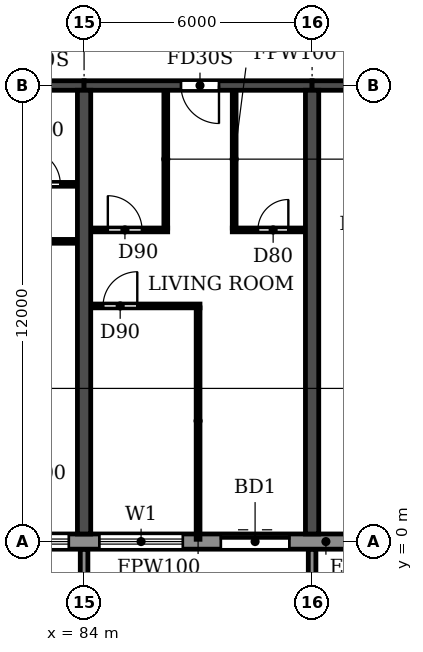
"""IFC4 building model, lengths in metres.
Left out: names, types, materials, properties, quantities, classifications, styles, units other than length and angle.
Written with IfcOpenShell. Run it as: python <this file> out.ifc"""

import sys

from ifc_helpers import new_model, si_unit, direction, frame, frame_2d, origin, place, context, subcontext, project, spatial, polyline, rectangle, outline, extrude, source, transform, mapped, element, fill, save


model = new_model("IFC4")
c1 = context("Model", 3, precision=1e-05, world=origin(), true_north=direction((0.0, 1.0)))
c2 = subcontext(c1, "Body", "Model", "MODEL_VIEW")
j1 = project(units=[si_unit("LENGTHUNIT", "METRE"), si_unit("PLANEANGLEUNIT", "RADIAN")], contexts=[c1])
p1 = place(None, origin())
s1 = spatial("IfcSite", under=j1, at=p1, CompositionType="ELEMENT")
p2 = place(p1, origin())
s2 = spatial("IfcBuilding", under=s1, at=p2, CompositionType="ELEMENT")
p3 = place(p2, frame((0.0, 0.0, 102.6)))
s3 = spatial("IfcBuildingStorey", under=s2, at=p3, CompositionType="ELEMENT", Elevation=102.6)
for number, where, z_axis, x_axis in (
    (1, (84.0, 0.2, 0.0), (0.0, 0.0, 1.0), (0.0, 1.0, 0.0)),
    (2, (90.0, 0.2, 0.0), (0.0, 0.0, 1.0), (0.0, 1.0, 0.0)),
):
    element("IfcWall", number, at=place(p3, frame(where, z_axis=z_axis, x_axis=x_axis)), inside=s3, PredefinedType="SHEAR", context=c2, shape_type="SweptSolid", body=[
        extrude(rectangle(XDim=11.675, YDim=0.35, at=frame_2d((5.837, 0.0))), origin(), (0.0, 0.0, 1.0), 3.0),
    ])
p4 = place(p3, frame((78.0, 12.0, 0.0), z_axis=(0.0, 0.0, 1.0), x_axis=(1.0, 0.0, 0.0)))
e3 = element("IfcWall", 3, at=p4, inside=s3, PredefinedType="SHEAR", context=c2, shape_type="SweptSolid", body=[
    extrude(rectangle(XDim=6.0, YDim=0.25, at=frame_2d((3.0, 0.0))), origin(), (0.0, 0.0, 1.0), 2.4),
])
p5 = place(p4, frame((2.45, 0.0, 0.0)))
e4 = element("IfcOpeningElement", 4, at=p5, cuts=e3, PredefinedType="OPENING", context=c2, shape_type="SweptSolid", body=[
    extrude(rectangle(XDim=1.0, YDim=2.1, at=frame_2d((0.5, 1.05))), frame((0.0, 0.135, 0.0), z_axis=(0.0, -1.0, 0.0), x_axis=(1.0, 0.0, 0.0)), (0.0, 0.0, 1.0), 0.27),
])
p6 = place(p3, frame((84.0, 12.0, 0.0), z_axis=(0.0, 0.0, 1.0), x_axis=(1.0, 0.0, 0.0)))
e5 = element("IfcWall", 5, at=p6, inside=s3, PredefinedType="SHEAR", context=c2, shape_type="SweptSolid", body=[
    extrude(rectangle(XDim=6.0, YDim=0.25, at=frame_2d((3.0, 0.0))), origin(), (0.0, 0.0, 1.0), 2.4),
])
p7 = place(p6, frame((2.55, 0.0, 0.0)))
e6 = element("IfcOpeningElement", 6, at=p7, cuts=e5, PredefinedType="OPENING", context=c2, shape_type="SweptSolid", body=[
    extrude(rectangle(XDim=1.0, YDim=2.1, at=frame_2d((0.5, 1.05))), frame((0.0, 0.135, 0.0), z_axis=(0.0, -1.0, 0.0), x_axis=(1.0, 0.0, 0.0)), (0.0, 0.0, 1.0), 0.27),
])
p8 = place(p3, frame((90.0, 12.0, 0.0), z_axis=(0.0, 0.0, 1.0), x_axis=(1.0, 0.0, 0.0)))
e7 = element("IfcWall", 7, at=p8, inside=s3, PredefinedType="SHEAR", context=c2, shape_type="SweptSolid", body=[
    extrude(rectangle(XDim=5.8, YDim=0.25, at=frame_2d((2.9, 0.0))), origin(), (0.0, 0.0, 1.0), 2.4),
])
p9 = place(p8, frame((2.5, 0.0, 0.0)))
e8 = element("IfcOpeningElement", 8, at=p9, cuts=e7, PredefinedType="OPENING", context=c2, shape_type="SweptSolid", body=[
    extrude(rectangle(XDim=1.0, YDim=2.1, at=frame_2d((0.5, 1.05))), frame((0.0, 0.135, 0.0), z_axis=(0.0, -1.0, 0.0), x_axis=(1.0, 0.0, 0.0)), (0.0, 0.0, 1.0), 0.27),
])
p10 = place(p3, frame((10.683, 0.0, 0.0), z_axis=(0.0, 0.0, 1.0), x_axis=(1.0, 0.0, 0.0)))
e9 = element("IfcWall", 9, at=p10, inside=s3, PredefinedType="STANDARD", context=c2, shape_type="SweptSolid", body=[
    extrude(rectangle(XDim=80.634, YDim=0.4, at=frame_2d((40.317, 0.0))), origin(), (0.0, 0.0, 1.0), 3.0),
])
p11 = place(p10, frame((1.717, 0.0, 0.9)))
e10 = element("IfcOpeningElement", 10, at=p11, cuts=e9, PredefinedType="OPENING", context=c2, shape_type="SweptSolid", body=[
    extrude(rectangle(XDim=2.2, YDim=1.5, at=frame_2d((1.1, 0.75))), frame((0.0, 0.21, 0.0), z_axis=(0.0, -1.0, 0.0), x_axis=(1.0, 0.0, 0.0)), (0.0, 0.0, 1.0), 0.42),
])
p12 = place(p10, frame((4.917, 0.0, 0.0)))
e11 = element("IfcOpeningElement", 11, at=p12, cuts=e9, PredefinedType="OPENING", context=c2, shape_type="SweptSolid", body=[
    extrude(rectangle(XDim=1.8, YDim=2.4, at=frame_2d((0.9, 1.2))), frame((0.0, 0.21, 0.0), z_axis=(0.0, -1.0, 0.0), x_axis=(1.0, 0.0, 0.0)), (0.0, 0.0, 1.0), 0.42),
])
p13 = place(p10, frame((7.717, 0.0, 0.9)))
e12 = element("IfcOpeningElement", 12, at=p13, cuts=e9, PredefinedType="OPENING", context=c2, shape_type="SweptSolid", body=[
    extrude(rectangle(XDim=2.2, YDim=1.5, at=frame_2d((1.1, 0.75))), frame((0.0, 0.21, 0.0), z_axis=(0.0, -1.0, 0.0), x_axis=(1.0, 0.0, 0.0)), (0.0, 0.0, 1.0), 0.42),
])
p14 = place(p10, frame((10.717, 0.0, 0.9)))
e13 = element("IfcOpeningElement", 13, at=p14, cuts=e9, PredefinedType="OPENING", context=c2, shape_type="SweptSolid", body=[
    extrude(rectangle(XDim=2.2, YDim=1.5, at=frame_2d((1.1, 0.75))), frame((0.0, 0.21, 0.0), z_axis=(0.0, -1.0, 0.0), x_axis=(1.0, 0.0, 0.0)), (0.0, 0.0, 1.0), 0.42),
])
p15 = place(p10, frame((13.717, 0.0, 0.9)))
e14 = element("IfcOpeningElement", 14, at=p15, cuts=e9, PredefinedType="OPENING", context=c2, shape_type="SweptSolid", body=[
    extrude(rectangle(XDim=2.2, YDim=1.5, at=frame_2d((1.1, 0.75))), frame((0.0, 0.21, 0.0), z_axis=(0.0, -1.0, 0.0), x_axis=(1.0, 0.0, 0.0)), (0.0, 0.0, 1.0), 0.42),
])
p16 = place(p10, frame((16.717, 0.0, 0.9)))
e15 = element("IfcOpeningElement", 15, at=p16, cuts=e9, PredefinedType="OPENING", context=c2, shape_type="SweptSolid", body=[
    extrude(rectangle(XDim=2.2, YDim=1.5, at=frame_2d((1.1, 0.75))), frame((0.0, 0.21, 0.0), z_axis=(0.0, -1.0, 0.0), x_axis=(1.0, 0.0, 0.0)), (0.0, 0.0, 1.0), 0.42),
])
p17 = place(p10, frame((19.717, 0.0, 0.9)))
e16 = element("IfcOpeningElement", 16, at=p17, cuts=e9, PredefinedType="OPENING", context=c2, shape_type="SweptSolid", body=[
    extrude(rectangle(XDim=2.2, YDim=1.5, at=frame_2d((1.1, 0.75))), frame((0.0, 0.21, 0.0), z_axis=(0.0, -1.0, 0.0), x_axis=(1.0, 0.0, 0.0)), (0.0, 0.0, 1.0), 0.42),
])
p18 = place(p10, frame((22.717, 0.0, 0.9)))
e17 = element("IfcOpeningElement", 17, at=p18, cuts=e9, PredefinedType="OPENING", context=c2, shape_type="SweptSolid", body=[
    extrude(rectangle(XDim=2.2, YDim=1.5, at=frame_2d((1.1, 0.75))), frame((0.0, 0.21, 0.0), z_axis=(0.0, -1.0, 0.0), x_axis=(1.0, 0.0, 0.0)), (0.0, 0.0, 1.0), 0.42),
])
p19 = place(p10, frame((25.717, 0.0, 0.9)))
e18 = element("IfcOpeningElement", 18, at=p19, cuts=e9, PredefinedType="OPENING", context=c2, shape_type="SweptSolid", body=[
    extrude(rectangle(XDim=2.2, YDim=1.5, at=frame_2d((1.1, 0.75))), frame((0.0, 0.21, 0.0), z_axis=(0.0, -1.0, 0.0), x_axis=(1.0, 0.0, 0.0)), (0.0, 0.0, 1.0), 0.42),
])
p20 = place(p10, frame((28.917, 0.0, 0.0)))
e19 = element("IfcOpeningElement", 19, at=p20, cuts=e9, PredefinedType="OPENING", context=c2, shape_type="SweptSolid", body=[
    extrude(rectangle(XDim=1.8, YDim=2.4, at=frame_2d((0.9, 1.2))), frame((0.0, 0.21, 0.0), z_axis=(0.0, -1.0, 0.0), x_axis=(1.0, 0.0, 0.0)), (0.0, 0.0, 1.0), 0.42),
])
p21 = place(p10, frame((31.717, 0.0, 0.9)))
e20 = element("IfcOpeningElement", 20, at=p21, cuts=e9, PredefinedType="OPENING", context=c2, shape_type="SweptSolid", body=[
    extrude(rectangle(XDim=2.2, YDim=1.5, at=frame_2d((1.1, 0.75))), frame((0.0, 0.21, 0.0), z_axis=(0.0, -1.0, 0.0), x_axis=(1.0, 0.0, 0.0)), (0.0, 0.0, 1.0), 0.42),
])
p22 = place(p10, frame((34.717, 0.0, 0.9)))
e21 = element("IfcOpeningElement", 21, at=p22, cuts=e9, PredefinedType="OPENING", context=c2, shape_type="SweptSolid", body=[
    extrude(rectangle(XDim=2.2, YDim=1.5, at=frame_2d((1.1, 0.75))), frame((0.0, 0.21, 0.0), z_axis=(0.0, -1.0, 0.0), x_axis=(1.0, 0.0, 0.0)), (0.0, 0.0, 1.0), 0.42),
])
p23 = place(p10, frame((37.717, 0.0, 0.9)))
e22 = element("IfcOpeningElement", 22, at=p23, cuts=e9, PredefinedType="OPENING", context=c2, shape_type="SweptSolid", body=[
    extrude(rectangle(XDim=2.2, YDim=1.5, at=frame_2d((1.1, 0.75))), frame((0.0, 0.21, 0.0), z_axis=(0.0, -1.0, 0.0), x_axis=(1.0, 0.0, 0.0)), (0.0, 0.0, 1.0), 0.42),
])
p24 = place(p10, frame((40.717, 0.0, 0.9)))
e23 = element("IfcOpeningElement", 23, at=p24, cuts=e9, PredefinedType="OPENING", context=c2, shape_type="SweptSolid", body=[
    extrude(rectangle(XDim=2.2, YDim=1.5, at=frame_2d((1.1, 0.75))), frame((0.0, 0.21, 0.0), z_axis=(0.0, -1.0, 0.0), x_axis=(1.0, 0.0, 0.0)), (0.0, 0.0, 1.0), 0.42),
])
p25 = place(p10, frame((43.717, 0.0, 0.9)))
e24 = element("IfcOpeningElement", 24, at=p25, cuts=e9, PredefinedType="OPENING", context=c2, shape_type="SweptSolid", body=[
    extrude(rectangle(XDim=2.2, YDim=1.5, at=frame_2d((1.1, 0.75))), frame((0.0, 0.21, 0.0), z_axis=(0.0, -1.0, 0.0), x_axis=(1.0, 0.0, 0.0)), (0.0, 0.0, 1.0), 0.42),
])
p26 = place(p10, frame((46.717, 0.0, 0.9)))
e25 = element("IfcOpeningElement", 25, at=p26, cuts=e9, PredefinedType="OPENING", context=c2, shape_type="SweptSolid", body=[
    extrude(rectangle(XDim=2.2, YDim=1.5, at=frame_2d((1.1, 0.75))), frame((0.0, 0.21, 0.0), z_axis=(0.0, -1.0, 0.0), x_axis=(1.0, 0.0, 0.0)), (0.0, 0.0, 1.0), 0.42),
])
p27 = place(p10, frame((49.917, 0.0, 0.0)))
e26 = element("IfcOpeningElement", 26, at=p27, cuts=e9, PredefinedType="OPENING", context=c2, shape_type="SweptSolid", body=[
    extrude(rectangle(XDim=1.8, YDim=2.4, at=frame_2d((0.9, 1.2))), frame((0.0, 0.21, 0.0), z_axis=(0.0, -1.0, 0.0), x_axis=(1.0, 0.0, 0.0)), (0.0, 0.0, 1.0), 0.42),
])
p28 = place(p10, frame((52.717, 0.0, 0.9)))
e27 = element("IfcOpeningElement", 27, at=p28, cuts=e9, PredefinedType="OPENING", context=c2, shape_type="SweptSolid", body=[
    extrude(rectangle(XDim=2.2, YDim=1.5, at=frame_2d((1.1, 0.75))), frame((0.0, 0.21, 0.0), z_axis=(0.0, -1.0, 0.0), x_axis=(1.0, 0.0, 0.0)), (0.0, 0.0, 1.0), 0.42),
])
p29 = place(p10, frame((55.717, 0.0, 0.9)))
e28 = element("IfcOpeningElement", 28, at=p29, cuts=e9, PredefinedType="OPENING", context=c2, shape_type="SweptSolid", body=[
    extrude(rectangle(XDim=2.2, YDim=1.5, at=frame_2d((1.1, 0.75))), frame((0.0, 0.21, 0.0), z_axis=(0.0, -1.0, 0.0), x_axis=(1.0, 0.0, 0.0)), (0.0, 0.0, 1.0), 0.42),
])
p30 = place(p10, frame((58.717, 0.0, 0.9)))
e29 = element("IfcOpeningElement", 29, at=p30, cuts=e9, PredefinedType="OPENING", context=c2, shape_type="SweptSolid", body=[
    extrude(rectangle(XDim=2.2, YDim=1.5, at=frame_2d((1.1, 0.75))), frame((0.0, 0.21, 0.0), z_axis=(0.0, -1.0, 0.0), x_axis=(1.0, 0.0, 0.0)), (0.0, 0.0, 1.0), 0.42),
])
p31 = place(p10, frame((61.717, 0.0, 0.9)))
e30 = element("IfcOpeningElement", 30, at=p31, cuts=e9, PredefinedType="OPENING", context=c2, shape_type="SweptSolid", body=[
    extrude(rectangle(XDim=2.2, YDim=1.5, at=frame_2d((1.1, 0.75))), frame((0.0, 0.21, 0.0), z_axis=(0.0, -1.0, 0.0), x_axis=(1.0, 0.0, 0.0)), (0.0, 0.0, 1.0), 0.42),
])
p32 = place(p10, frame((64.717, 0.0, 0.9)))
e31 = element("IfcOpeningElement", 31, at=p32, cuts=e9, PredefinedType="OPENING", context=c2, shape_type="SweptSolid", body=[
    extrude(rectangle(XDim=2.2, YDim=1.5, at=frame_2d((1.1, 0.75))), frame((0.0, 0.21, 0.0), z_axis=(0.0, -1.0, 0.0), x_axis=(1.0, 0.0, 0.0)), (0.0, 0.0, 1.0), 0.42),
])
p33 = place(p10, frame((67.717, 0.0, 0.9)))
e32 = element("IfcOpeningElement", 32, at=p33, cuts=e9, PredefinedType="OPENING", context=c2, shape_type="SweptSolid", body=[
    extrude(rectangle(XDim=2.2, YDim=1.5, at=frame_2d((1.1, 0.75))), frame((0.0, 0.21, 0.0), z_axis=(0.0, -1.0, 0.0), x_axis=(1.0, 0.0, 0.0)), (0.0, 0.0, 1.0), 0.42),
])
p34 = place(p10, frame((70.717, 0.0, 0.9)))
e33 = element("IfcOpeningElement", 33, at=p34, cuts=e9, PredefinedType="OPENING", context=c2, shape_type="SweptSolid", body=[
    extrude(rectangle(XDim=2.2, YDim=1.5, at=frame_2d((1.1, 0.75))), frame((0.0, 0.21, 0.0), z_axis=(0.0, -1.0, 0.0), x_axis=(1.0, 0.0, 0.0)), (0.0, 0.0, 1.0), 0.42),
])
p35 = place(p10, frame((73.717, 0.0, 0.9)))
e34 = element("IfcOpeningElement", 34, at=p35, cuts=e9, PredefinedType="OPENING", context=c2, shape_type="SweptSolid", body=[
    extrude(rectangle(XDim=2.2, YDim=1.5, at=frame_2d((1.1, 0.75))), frame((0.0, 0.21, 0.0), z_axis=(0.0, -1.0, 0.0), x_axis=(1.0, 0.0, 0.0)), (0.0, 0.0, 1.0), 0.42),
])
p36 = place(p10, frame((76.917, 0.0, 0.0)))
e35 = element("IfcOpeningElement", 35, at=p36, cuts=e9, PredefinedType="OPENING", context=c2, shape_type="SweptSolid", body=[
    extrude(rectangle(XDim=1.8, YDim=2.4, at=frame_2d((0.9, 1.2))), frame((0.0, 0.21, 0.0), z_axis=(0.0, -1.0, 0.0), x_axis=(1.0, 0.0, 0.0)), (0.0, 0.0, 1.0), 0.42),
])
m1 = source(origin(), c2, "Body", "SweptSolid", [
    extrude(outline(polyline([(0.0, 0.0), (0.2, 0.0), (0.2, 1.65), (0.0, 1.65), (0.0, 0.0)])), origin(), (0.0, 0.0, 1.0), 3.1),
])
for number, where in (
    (36, (83.9, -1.85, 0.0)),
    (37, (89.9, -1.85, 0.0)),
):
    element("IfcWall", number, at=place(p3, frame(where)), inside=s3, PredefinedType="STANDARD", context=c2, shape_type="MappedRepresentation", body=[
        mapped(m1, transform((0.0, 0.0, 0.0))),
    ])
p37 = place(p3, frame((84.185, 6.2, 0.0), z_axis=(0.0, 0.0, 1.0), x_axis=(1.0, 0.0, 0.0)))
e38 = element("IfcWall", 38, at=p37, inside=s3, PredefinedType="PARTITIONING", context=c2, shape_type="SweptSolid", body=[
    extrude(rectangle(XDim=2.865, YDim=0.1, at=frame_2d((1.433, 0.0))), origin(), (0.0, 0.0, 1.0), 3.0),
])
p38 = place(p37, frame((0.315, 0.0, 0.0)))
e39 = element("IfcOpeningElement", 39, at=p38, cuts=e38, PredefinedType="OPENING", context=c2, shape_type="SweptSolid", body=[
    extrude(rectangle(XDim=0.9, YDim=2.1, at=frame_2d((0.45, 1.05))), frame((0.0, 0.06, 0.0), z_axis=(0.0, -1.0, 0.0), x_axis=(1.0, 0.0, 0.0)), (0.0, 0.0, 1.0), 0.12),
])
p39 = place(p3, frame((80.95, 7.9, 0.0), z_axis=(0.0, 0.0, 1.0), x_axis=(1.0, 0.0, 0.0)))
e40 = element("IfcWall", 40, at=p39, inside=s3, PredefinedType="PARTITIONING", context=c2, shape_type="SweptSolid", body=[
    extrude(rectangle(XDim=2.865, YDim=0.1, at=frame_2d((1.433, 0.0))), origin(), (0.0, 0.0, 1.0), 3.0),
])
p40 = place(p39, frame((0.55, 0.0, 0.0)))
e41 = element("IfcOpeningElement", 41, at=p40, cuts=e40, PredefinedType="OPENING", context=c2, shape_type="SweptSolid", body=[
    extrude(rectangle(XDim=0.9, YDim=2.1, at=frame_2d((0.45, 1.05))), frame((0.0, 0.06, 0.0), z_axis=(0.0, -1.0, 0.0), x_axis=(1.0, 0.0, 0.0)), (0.0, 0.0, 1.0), 0.12),
])
p41 = place(p3, frame((84.185, 8.2, 0.0), z_axis=(0.0, 0.0, 1.0), x_axis=(1.0, 0.0, 0.0)))
e42 = element("IfcWall", 42, at=p41, inside=s3, PredefinedType="PARTITIONING", context=c2, shape_type="SweptSolid", body=[
    extrude(rectangle(XDim=2.015, YDim=0.1, at=frame_2d((1.007, 0.0))), origin(), (0.0, 0.0, 1.0), 3.0),
])
p42 = place(p41, frame((0.44, 0.0, 0.0)))
e43 = element("IfcOpeningElement", 43, at=p42, cuts=e42, PredefinedType="OPENING", context=c2, shape_type="SweptSolid", body=[
    extrude(rectangle(XDim=0.9, YDim=2.1, at=frame_2d((0.45, 1.05))), frame((0.0, 0.06, 0.0), z_axis=(0.0, -1.0, 0.0), x_axis=(1.0, 0.0, 0.0)), (0.0, 0.0, 1.0), 0.12),
])
p43 = place(p3, frame((87.9, 8.2, 0.0), z_axis=(0.0, 0.0, 1.0), x_axis=(1.0, 0.0, 0.0)))
e44 = element("IfcWall", 44, at=p43, inside=s3, PredefinedType="PARTITIONING", context=c2, shape_type="SweptSolid", body=[
    extrude(rectangle(XDim=1.915, YDim=0.1, at=frame_2d((0.958, 0.0))), origin(), (0.0, 0.0, 1.0), 3.0),
])
p44 = place(p43, frame((0.675, 0.0, 0.0)))
e45 = element("IfcOpeningElement", 45, at=p44, cuts=e44, PredefinedType="OPENING", context=c2, shape_type="SweptSolid", body=[
    extrude(rectangle(XDim=0.8, YDim=2.1, at=frame_2d((0.4, 1.05))), frame((0.0, 0.06, 0.0), z_axis=(0.0, -1.0, 0.0), x_axis=(1.0, 0.0, 0.0)), (0.0, 0.0, 1.0), 0.12),
])
p45 = place(p3, frame((81.8, 9.4, 0.0), z_axis=(0.0, 0.0, 1.0), x_axis=(1.0, 0.0, 0.0)))
e46 = element("IfcWall", 46, at=p45, inside=s3, PredefinedType="PARTITIONING", context=c2, shape_type="SweptSolid", body=[
    extrude(rectangle(XDim=2.015, YDim=0.1, at=frame_2d((1.007, 0.0))), origin(), (0.0, 0.0, 1.0), 3.0),
])
p46 = place(p45, frame((0.675, 0.0, 0.0)))
e47 = element("IfcOpeningElement", 47, at=p46, cuts=e46, PredefinedType="OPENING", context=c2, shape_type="SweptSolid", body=[
    extrude(rectangle(XDim=0.9, YDim=2.1, at=frame_2d((0.45, 1.05))), frame((0.0, 0.06, 0.0), z_axis=(0.0, -1.0, 0.0), x_axis=(1.0, 0.0, 0.0)), (0.0, 0.0, 1.0), 0.12),
])
p47 = place(p3, frame((86.15, 8.25, 0.0), z_axis=(0.0, 0.0, 1.0), x_axis=(0.0, 1.0, 0.0)))
e48 = element("IfcWall", 48, at=p47, inside=s3, PredefinedType="PARTITIONING", context=c2, shape_type="SweptSolid", body=[
    extrude(rectangle(XDim=3.615, YDim=0.1, at=frame_2d((1.808, 0.0))), origin(), (0.0, 0.0, 1.0), 3.0),
])
p48 = place(p3, frame((87.0, 0.06, 0.0), z_axis=(0.0, 0.0, 1.0), x_axis=(0.0, 1.0, 0.0)))
e49 = element("IfcWall", 49, at=p48, inside=s3, PredefinedType="PARTITIONING", context=c2, shape_type="SweptSolid", body=[
    extrude(rectangle(XDim=6.09, YDim=0.1, at=frame_2d((3.045, 0.0))), origin(), (0.0, 0.0, 1.0), 3.0),
])
p49 = place(p3, frame((87.95, 8.25, 0.0), z_axis=(0.0, 0.0, 1.0), x_axis=(0.0, 1.0, 0.0)))
e50 = element("IfcWall", 50, at=p49, inside=s3, PredefinedType="PARTITIONING", context=c2, shape_type="SweptSolid", body=[
    extrude(rectangle(XDim=3.615, YDim=0.1, at=frame_2d((1.808, 0.0))), origin(), (0.0, 0.0, 1.0), 3.0),
])
p50 = place(p34, origin())
e51 = element("IfcWindow", 51, at=p50, inside=s3, PartitioningType="DOUBLE_PANEL_HORIZONTAL", PredefinedType="WINDOW", context=c2, shape_type="SweptSolid", body=[
    extrude(rectangle(XDim=2.2, YDim=1.5, at=frame_2d((1.1, 0.75))), frame((0.0, 0.03, 0.0), z_axis=(0.0, -1.0, 0.0), x_axis=(1.0, 0.0, 0.0)), (0.0, 0.0, 1.0), 0.06),
])
fill(e33, e51)
p51 = place(p35, origin())
e52 = element("IfcWindow", 52, at=p51, inside=s3, PartitioningType="DOUBLE_PANEL_HORIZONTAL", PredefinedType="WINDOW", context=c2, shape_type="SweptSolid", body=[
    extrude(rectangle(XDim=2.2, YDim=1.5, at=frame_2d((1.1, 0.75))), frame((0.0, 0.03, 0.0), z_axis=(0.0, -1.0, 0.0), x_axis=(1.0, 0.0, 0.0)), (0.0, 0.0, 1.0), 0.06),
])
fill(e34, e52)
p52 = place(p36, origin())
e53 = element("IfcDoor", 53, at=p52, inside=s3, OperationType="DOUBLE_DOOR_SLIDING", PredefinedType="DOOR", context=c2, shape_type="SweptSolid", body=[
    extrude(rectangle(XDim=1.8, YDim=2.4, at=frame_2d((0.9, 1.2))), frame((0.0, 0.025, 0.0), z_axis=(0.0, -1.0, 0.0), x_axis=(1.0, 0.0, 0.0)), (0.0, 0.0, 1.0), 0.05),
])
fill(e35, e53)
p53 = place(p46, origin())
e54 = element("IfcDoor", 54, at=p53, inside=s3, OperationType="SINGLE_SWING_LEFT", PredefinedType="DOOR", context=c2, shape_type="SweptSolid", body=[
    extrude(rectangle(XDim=0.9, YDim=2.1, at=frame_2d((0.45, 1.05))), frame((0.0, 0.025, 0.0), z_axis=(0.0, -1.0, 0.0), x_axis=(1.0, 0.0, 0.0)), (0.0, 0.0, 1.0), 0.05),
])
fill(e47, e54)
p54 = place(p38, origin())
e55 = element("IfcDoor", 55, at=p54, inside=s3, OperationType="SINGLE_SWING_RIGHT", PredefinedType="DOOR", context=c2, shape_type="SweptSolid", body=[
    extrude(rectangle(XDim=0.9, YDim=2.1, at=frame_2d((0.45, 1.05))), frame((0.0, 0.025, 0.0), z_axis=(0.0, -1.0, 0.0), x_axis=(1.0, 0.0, 0.0)), (0.0, 0.0, 1.0), 0.05),
])
fill(e39, e55)
p55 = place(p42, origin())
e56 = element("IfcDoor", 56, at=p55, inside=s3, OperationType="SINGLE_SWING_LEFT", PredefinedType="DOOR", context=c2, shape_type="SweptSolid", body=[
    extrude(rectangle(XDim=0.9, YDim=2.1, at=frame_2d((0.45, 1.05))), frame((0.0, 0.025, 0.0), z_axis=(0.0, -1.0, 0.0), x_axis=(1.0, 0.0, 0.0)), (0.0, 0.0, 1.0), 0.05),
])
fill(e43, e56)
p56 = place(p7, frame((1.0, 0.0, 0.0), z_axis=(0.0, 0.0, 1.0), x_axis=(-1.0, 0.0, 0.0)))
e57 = element("IfcDoor", 57, at=p56, inside=s3, OperationType="SINGLE_SWING_LEFT", PredefinedType="DOOR", context=c2, shape_type="SweptSolid", body=[
    extrude(rectangle(XDim=1.0, YDim=2.1, at=frame_2d((0.5, 1.05))), frame((0.0, 0.025, 0.0), z_axis=(0.0, -1.0, 0.0), x_axis=(1.0, 0.0, 0.0)), (0.0, 0.0, 1.0), 0.05),
])
fill(e6, e57)
p57 = place(p44, origin())
e58 = element("IfcDoor", 58, at=p57, inside=s3, OperationType="SINGLE_SWING_RIGHT", PredefinedType="DOOR", context=c2, shape_type="SweptSolid", body=[
    extrude(rectangle(XDim=0.8, YDim=2.1, at=frame_2d((0.4, 1.05))), frame((0.0, 0.025, 0.0), z_axis=(0.0, -1.0, 0.0), x_axis=(1.0, 0.0, 0.0)), (0.0, 0.0, 1.0), 0.05),
])
fill(e45, e58)
save(model, sys.argv[1])
